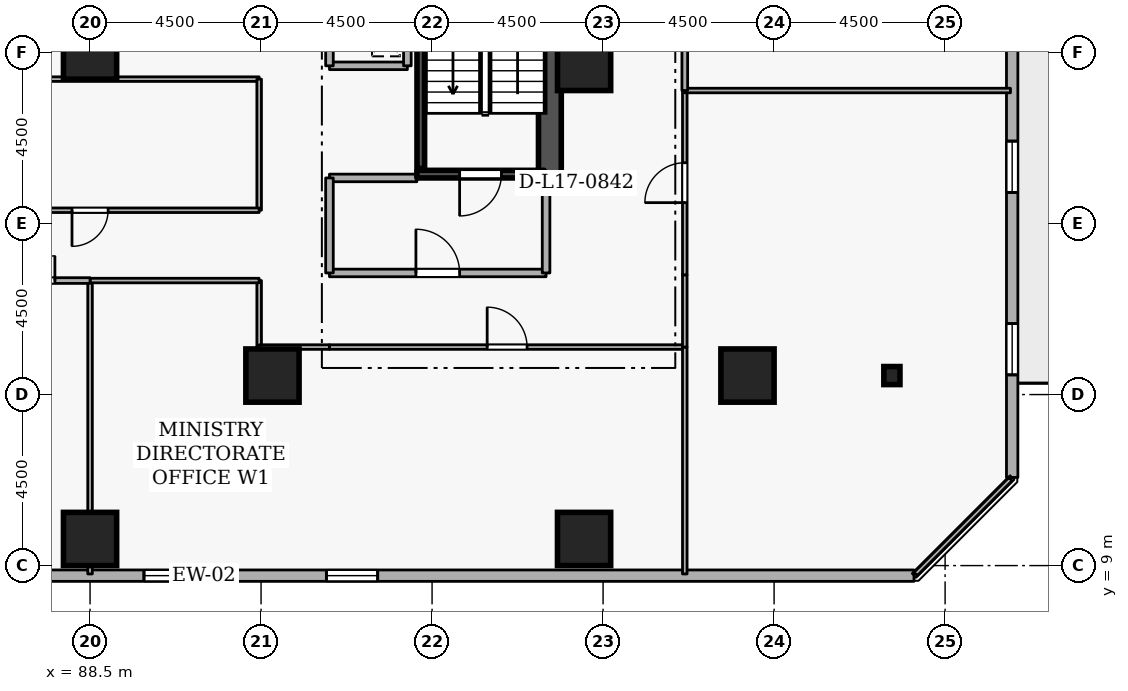
"""IFC4 building model, lengths in metres.
Left out: names, types, materials, properties, quantities, classifications, styles, units other than length and angle.
Written with IfcOpenShell. Run it as: python <this file> out.ifc"""

import sys

from ifc_helpers import new_model, si_unit, direction, frame, frame_2d, origin, origin_2d, place, context, subcontext, project, spatial, rectangle, i_section, extrude, element, fill, save


model = new_model("IFC4")
c1 = context("Model", 3, precision=1e-05, world=origin(), true_north=direction((0.0, 1.0)))
c2 = subcontext(c1, "Body", "Model", "MODEL_VIEW")
j1 = project(units=[si_unit("LENGTHUNIT", "METRE"), si_unit("PLANEANGLEUNIT", "RADIAN")], contexts=[c1])
p1 = place(None, origin())
s1 = spatial("IfcSite", under=j1, at=p1, CompositionType="ELEMENT")
p2 = place(p1, origin())
s2 = spatial("IfcBuilding", under=s1, at=p2, CompositionType="ELEMENT")
p3 = place(p2, frame((0.0, 0.0, 68.1)))
s3 = spatial("IfcBuildingStorey", under=s2, at=p3, CompositionType="ELEMENT", Elevation=68.1)
p4 = place(p3, frame((100.6, 19.2, 0.0), z_axis=(0.0, 0.0, 1.0), x_axis=(0.0, 1.0, 0.0)))
e1 = element("IfcWall", 1, at=p4, inside=s3, PredefinedType="SHEAR", context=c2, shape_type="SweptSolid", body=[
    extrude(rectangle(XDim=15.6, YDim=0.6, at=frame_2d((7.8, 0.0))), origin(), (0.0, 0.0, 1.0), 3.6),
])
for number, where, z_axis, x_axis in (
    (2, (105.8, 14.0, 0.0), (0.0, 0.0, 1.0), (1.0, 0.0, 0.0)),
    (3, (101.5, 9.7, 0.0), (0.0, 0.0, 1.0), (1.0, 0.0, 0.0)),
    (4, (88.5, 9.7, 0.0), (0.0, 0.0, 1.0), (1.0, 0.0, 0.0)),
    (5, (93.3, 14.0, 0.0), (0.0, 0.0, 1.0), (1.0, 0.0, 0.0)),
    (6, (101.5, 22.2, 0.0), (0.0, 0.0, 1.0), (1.0, 0.0, 0.0)),
    (7, (88.5, 22.5, 0.0), (0.0, 0.0, 1.0), (1.0, 0.0, 0.0)),
):
    element("IfcColumn", number, at=place(p3, frame(where, z_axis=z_axis, x_axis=x_axis)), inside=s3, PredefinedType="COLUMN", context=c2, shape_type="SweptSolid", body=[
        extrude(rectangle(XDim=1.4, YDim=1.4, at=origin_2d()), origin(), (0.0, 0.0, 1.0), 3.6),
    ])
p5 = place(p3, frame((109.6, 14.0, 0.0), z_axis=(0.0, 0.0, 1.0), x_axis=(1.0, 0.0, 0.0)))
e8 = element("IfcColumn", 8, at=p5, inside=s3, PredefinedType="COLUMN", context=c2, shape_type="SweptSolid", body=[
    extrude(i_section(OverallWidth=0.424, OverallDepth=0.475, WebThickness=0.048, FlangeThickness=0.077, FilletRadius=0.015, at=origin_2d()), origin(), (0.0, 0.0, 1.0), 3.6),
])
p6 = place(p3, frame((72.819, 8.735, 0.0), z_axis=(0.0, 0.0, 1.0), x_axis=(1.0, 0.0, 0.0)))
e9 = element("IfcWall", 9, at=p6, inside=s3, PredefinedType="STANDARD", context=c2, shape_type="SweptSolid", body=[
    extrude(rectangle(XDim=37.362, YDim=0.3, at=frame_2d((18.681, 0.0))), origin(), (0.0, 0.0, 1.0), 2.66),
])
p7 = place(p6, frame((7.5, 0.0, 0.72)))
e10 = element("IfcOpeningElement", 10, at=p7, cuts=e9, PredefinedType="OPENING", context=c2, shape_type="SweptSolid", body=[
    extrude(rectangle(XDim=1.35, YDim=1.05, at=frame_2d((0.675, 0.525))), frame((0.0, 0.16, 0.0), z_axis=(0.0, -1.0, 0.0), x_axis=(1.0, 0.0, 0.0)), (0.0, 0.0, 1.0), 0.32),
])
p8 = place(p6, frame((17.1, 0.0, 0.72)))
e11 = element("IfcOpeningElement", 11, at=p8, cuts=e9, PredefinedType="OPENING", context=c2, shape_type="SweptSolid", body=[
    extrude(rectangle(XDim=1.35, YDim=1.05, at=frame_2d((0.675, 0.525))), frame((0.0, 0.16, 0.0), z_axis=(0.0, -1.0, 0.0), x_axis=(1.0, 0.0, 0.0)), (0.0, 0.0, 1.0), 0.32),
])
p9 = place(p6, frame((21.9, 0.0, 0.72)))
e12 = element("IfcOpeningElement", 12, at=p9, cuts=e9, PredefinedType="OPENING", context=c2, shape_type="SweptSolid", body=[
    extrude(rectangle(XDim=1.35, YDim=1.05, at=frame_2d((0.675, 0.525))), frame((0.0, 0.16, 0.0), z_axis=(0.0, -1.0, 0.0), x_axis=(1.0, 0.0, 0.0)), (0.0, 0.0, 1.0), 0.32),
])
p10 = place(p3, frame((112.765, 11.319, 0.0), z_axis=(0.0, 0.0, 1.0), x_axis=(0.0, 1.0, 0.0)))
e13 = element("IfcWall", 13, at=p10, inside=s3, PredefinedType="STANDARD", context=c2, shape_type="SweptSolid", body=[
    extrude(rectangle(XDim=37.362, YDim=0.3, at=frame_2d((18.681, 0.0))), origin(), (0.0, 0.0, 1.0), 2.66),
])
p11 = place(p10, frame((19.581, 0.0, 0.0)))
e14 = element("IfcOpeningElement", 14, at=p11, cuts=e13, PredefinedType="OPENING", context=c2, shape_type="SweptSolid", body=[
    extrude(rectangle(XDim=1.0, YDim=2.08, at=frame_2d((0.5, 1.04))), frame((0.0, 0.16, 0.0), z_axis=(0.0, -1.0, 0.0), x_axis=(1.0, 0.0, 0.0)), (0.0, 0.0, 1.0), 0.32),
])
p12 = place(p10, frame((2.7, 0.0, 0.72)))
e15 = element("IfcOpeningElement", 15, at=p12, cuts=e13, PredefinedType="OPENING", context=c2, shape_type="SweptSolid", body=[
    extrude(rectangle(XDim=1.35, YDim=1.05, at=frame_2d((0.675, 0.525))), frame((0.0, 0.16, 0.0), z_axis=(0.0, -1.0, 0.0), x_axis=(1.0, 0.0, 0.0)), (0.0, 0.0, 1.0), 0.32),
])
p13 = place(p10, frame((7.5, 0.0, 0.72)))
e16 = element("IfcOpeningElement", 16, at=p13, cuts=e13, PredefinedType="OPENING", context=c2, shape_type="SweptSolid", body=[
    extrude(rectangle(XDim=1.35, YDim=1.05, at=frame_2d((0.675, 0.525))), frame((0.0, 0.16, 0.0), z_axis=(0.0, -1.0, 0.0), x_axis=(1.0, 0.0, 0.0)), (0.0, 0.0, 1.0), 0.32),
])
p14 = place(p10, frame((12.3, 0.0, 0.72)))
e17 = element("IfcOpeningElement", 17, at=p14, cuts=e13, PredefinedType="OPENING", context=c2, shape_type="SweptSolid", body=[
    extrude(rectangle(XDim=1.35, YDim=1.05, at=frame_2d((0.675, 0.525))), frame((0.0, 0.16, 0.0), z_axis=(0.0, -1.0, 0.0), x_axis=(1.0, 0.0, 0.0)), (0.0, 0.0, 1.0), 0.32),
])
p15 = place(p10, frame((17.1, 0.0, 0.72)))
e18 = element("IfcOpeningElement", 18, at=p15, cuts=e13, PredefinedType="OPENING", context=c2, shape_type="SweptSolid", body=[
    extrude(rectangle(XDim=1.35, YDim=1.05, at=frame_2d((0.675, 0.525))), frame((0.0, 0.16, 0.0), z_axis=(0.0, -1.0, 0.0), x_axis=(1.0, 0.0, 0.0)), (0.0, 0.0, 1.0), 0.32),
])
p16 = place(p10, frame((21.9, 0.0, 0.72)))
e19 = element("IfcOpeningElement", 19, at=p16, cuts=e13, PredefinedType="OPENING", context=c2, shape_type="SweptSolid", body=[
    extrude(rectangle(XDim=1.35, YDim=1.05, at=frame_2d((0.675, 0.525))), frame((0.0, 0.16, 0.0), z_axis=(0.0, -1.0, 0.0), x_axis=(1.0, 0.0, 0.0)), (0.0, 0.0, 1.0), 0.32),
])
p17 = place(p10, frame((26.7, 0.0, 0.72)))
e20 = element("IfcOpeningElement", 20, at=p17, cuts=e13, PredefinedType="OPENING", context=c2, shape_type="SweptSolid", body=[
    extrude(rectangle(XDim=1.35, YDim=1.05, at=frame_2d((0.675, 0.525))), frame((0.0, 0.16, 0.0), z_axis=(0.0, -1.0, 0.0), x_axis=(1.0, 0.0, 0.0)), (0.0, 0.0, 1.0), 0.32),
])
p18 = place(p10, frame((31.5, 0.0, 0.72)))
e21 = element("IfcOpeningElement", 21, at=p18, cuts=e13, PredefinedType="OPENING", context=c2, shape_type="SweptSolid", body=[
    extrude(rectangle(XDim=1.35, YDim=1.05, at=frame_2d((0.675, 0.525))), frame((0.0, 0.16, 0.0), z_axis=(0.0, -1.0, 0.0), x_axis=(1.0, 0.0, 0.0)), (0.0, 0.0, 1.0), 0.32),
])
p19 = place(p3, frame((100.45, 19.3, 0.0), z_axis=(0.0, 0.0, 1.0), x_axis=(-1.0, 0.0, 0.0)))
e22 = element("IfcWall", 22, at=p19, inside=s3, PredefinedType="SHEAR", context=c2, shape_type="SweptSolid", body=[
    extrude(rectangle(XDim=3.35, YDim=0.2, at=frame_2d((1.675, 0.0))), origin(), (0.0, 0.0, 1.0), 3.6),
])
p20 = place(p19, frame((1.125, 0.0, 0.0)))
e23 = element("IfcOpeningElement", 23, at=p20, cuts=e22, PredefinedType="OPENING", context=c2, shape_type="SweptSolid", body=[
    extrude(rectangle(XDim=1.1, YDim=2.1, at=frame_2d((0.55, 1.05))), frame((0.0, 0.11, 0.0), z_axis=(0.0, -1.0, 0.0), x_axis=(1.0, 0.0, 0.0)), (0.0, 0.0, 1.0), 0.22),
])
p21 = place(p3, frame((97.203, 26.55, 0.0), z_axis=(0.0, 0.0, 1.0), x_axis=(0.0, -1.0, 0.0)))
e24 = element("IfcWall", 24, at=p21, inside=s3, PredefinedType="SHEAR", context=c2, shape_type="SweptSolid", body=[
    extrude(rectangle(XDim=7.1, YDim=0.2, at=frame_2d((3.55, 0.0))), origin(), (0.0, 0.0, 1.0), 3.6),
])
p22 = place(p3, frame((94.8, 16.7, 0.0), z_axis=(0.0, 0.0, 1.0), x_axis=(1.0, 0.0, 0.0)))
e25 = element("IfcWall", 25, at=p22, inside=s3, PredefinedType="STANDARD", context=c2, shape_type="SweptSolid", body=[
    extrude(rectangle(XDim=5.7, YDim=0.2, at=frame_2d((2.85, 0.0))), origin(), (0.0, 0.0, 1.0), 3.26),
])
p23 = place(p22, frame((2.275, 0.0, 0.0)))
e26 = element("IfcOpeningElement", 26, at=p23, cuts=e25, PredefinedType="OPENING", context=c2, shape_type="SweptSolid", body=[
    extrude(rectangle(XDim=1.15, YDim=2.1, at=frame_2d((0.575, 1.05))), frame((0.0, 0.11, 0.0), z_axis=(0.0, -1.0, 0.0), x_axis=(1.0, 0.0, 0.0)), (0.0, 0.0, 1.0), 0.22),
])
p24 = place(p3, frame((100.5, 16.7, 0.0), z_axis=(0.0, 0.0, 1.0), x_axis=(0.0, 1.0, 0.0)))
e27 = element("IfcWall", 27, at=p24, inside=s3, PredefinedType="STANDARD", context=c2, shape_type="SweptSolid", body=[
    extrude(rectangle(XDim=2.5, YDim=0.2, at=frame_2d((1.25, 0.0))), origin(), (0.0, 0.0, 1.0), 3.26),
])
p25 = place(p3, frame((97.1, 19.2, 0.0), z_axis=(0.0, 0.0, 1.0), x_axis=(-1.0, 0.0, 0.0)))
e28 = element("IfcWall", 28, at=p25, inside=s3, PredefinedType="STANDARD", context=c2, shape_type="SweptSolid", body=[
    extrude(rectangle(XDim=2.3, YDim=0.2, at=frame_2d((1.15, 0.0))), origin(), (0.0, 0.0, 1.0), 2.465),
])
p26 = place(p3, frame((94.8, 19.2, 0.0), z_axis=(0.0, 0.0, 1.0), x_axis=(0.0, -1.0, 0.0)))
e29 = element("IfcWall", 29, at=p26, inside=s3, PredefinedType="STANDARD", context=c2, shape_type="SweptSolid", body=[
    extrude(rectangle(XDim=2.5, YDim=0.2, at=frame_2d((1.25, 0.0))), origin(), (0.0, 0.0, 1.0), 3.26),
])
p27 = place(p3, frame((94.8, 22.15, 0.0), z_axis=(0.0, 0.0, 1.0), x_axis=(1.0, 0.0, 0.0)))
e30 = element("IfcWall", 30, at=p27, inside=s3, PredefinedType="STANDARD", context=c2, shape_type="SweptSolid", body=[
    extrude(rectangle(XDim=2.05, YDim=0.2, at=frame_2d((1.025, 0.0))), origin(), (0.0, 0.0, 1.0), 3.26),
])
p28 = place(p3, frame((96.85, 22.15, 0.0), z_axis=(0.0, 0.0, 1.0), x_axis=(0.0, 1.0, 0.0)))
e31 = element("IfcWall", 31, at=p28, inside=s3, PredefinedType="STANDARD", context=c2, shape_type="SweptSolid", body=[
    extrude(rectangle(XDim=1.8, YDim=0.2, at=frame_2d((0.9, 0.0))), origin(), (0.0, 0.0, 1.0), 3.26),
])
p29 = place(p3, frame((94.8, 23.95, 0.0), z_axis=(0.0, 0.0, 1.0), x_axis=(0.0, -1.0, 0.0)))
e32 = element("IfcWall", 32, at=p29, inside=s3, PredefinedType="STANDARD", context=c2, shape_type="SweptSolid", body=[
    extrude(rectangle(XDim=1.8, YDim=0.2, at=frame_2d((0.9, 0.0))), origin(), (0.0, 0.0, 1.0), 3.26),
])
p30 = place(p29, frame((0.46, 0.0, 0.0)))
e33 = element("IfcOpeningElement", 33, at=p30, cuts=e32, PredefinedType="OPENING", context=c2, shape_type="SweptSolid", body=[
    extrude(rectangle(XDim=0.88, YDim=2.04, at=frame_2d((0.44, 1.02))), frame((0.0, 0.11, 0.0), z_axis=(0.0, -1.0, 0.0), x_axis=(1.0, 0.0, 0.0)), (0.0, 0.0, 1.0), 0.22),
])
p31 = place(p3, frame((92.95, 16.5, 0.0), z_axis=(0.0, 0.0, 1.0), x_axis=(0.0, -1.0, 0.0)))
e34 = element("IfcWall", 34, at=p31, inside=s3, PredefinedType="PARTITIONING", context=c2, shape_type="SweptSolid", body=[
    extrude(rectangle(XDim=1.75, YDim=0.12, at=frame_2d((0.875, 0.0))), origin(), (0.0, 0.0, 1.0), 3.26),
])
p32 = place(p3, frame((92.95, 14.75, 0.0), z_axis=(0.0, 0.0, 1.0), x_axis=(1.0, 0.0, 0.0)))
e35 = element("IfcWall", 35, at=p32, inside=s3, PredefinedType="PARTITIONING", context=c2, shape_type="SweptSolid", body=[
    extrude(rectangle(XDim=1.85, YDim=0.12, at=frame_2d((0.925, 0.0))), origin(), (0.0, 0.0, 1.0), 3.26),
])
p33 = place(p3, frame((94.8, 14.75, 0.0), z_axis=(0.0, 0.0, 1.0), x_axis=(1.0, 0.0, 0.0)))
e36 = element("IfcWall", 36, at=p33, inside=s3, PredefinedType="PARTITIONING", context=c2, shape_type="SweptSolid", body=[
    extrude(rectangle(XDim=9.35, YDim=0.12, at=frame_2d((4.675, 0.0))), origin(), (0.0, 0.0, 1.0), 3.26),
])
p34 = place(p33, frame((4.15, 0.0, 0.0)))
e37 = element("IfcOpeningElement", 37, at=p34, cuts=e36, PredefinedType="OPENING", context=c2, shape_type="SweptSolid", body=[
    extrude(rectangle(XDim=1.05, YDim=2.1, at=frame_2d((0.525, 1.05))), frame((0.0, 0.07, 0.0), z_axis=(0.0, -1.0, 0.0), x_axis=(1.0, 0.0, 0.0)), (0.0, 0.0, 1.0), 0.14),
])
p35 = place(p3, frame((104.15, 14.75, 0.0), z_axis=(0.0, 0.0, 1.0), x_axis=(0.0, -1.0, 0.0)))
e38 = element("IfcWall", 38, at=p35, inside=s3, PredefinedType="PARTITIONING", context=c2, shape_type="SweptSolid", body=[
    extrude(rectangle(XDim=5.97, YDim=0.12, at=frame_2d((2.985, 0.0))), origin(), (0.0, 0.0, 1.0), 3.26),
])
p36 = place(p3, frame((88.5, 8.78, 0.0), z_axis=(0.0, 0.0, 1.0), x_axis=(0.0, 1.0, 0.0)))
e39 = element("IfcWall", 39, at=p36, inside=s3, PredefinedType="PARTITIONING", context=c2, shape_type="SweptSolid", body=[
    extrude(rectangle(XDim=7.72, YDim=0.12, at=frame_2d((3.86, 0.0))), origin(), (0.0, 0.0, 1.0), 2.798),
])
p37 = place(p3, frame((88.5, 16.5, 0.0), z_axis=(0.0, 0.0, 1.0), x_axis=(1.0, 0.0, 0.0)))
e40 = element("IfcWall", 40, at=p37, inside=s3, PredefinedType="PARTITIONING", context=c2, shape_type="SweptSolid", body=[
    extrude(rectangle(XDim=4.45, YDim=0.12, at=frame_2d((2.225, 0.0))), origin(), (0.0, 0.0, 1.0), 3.26),
])
p38 = place(p3, frame((85.35, 16.5, 0.0), z_axis=(0.0, 0.0, 1.0), x_axis=(1.0, 0.0, 0.0)))
e41 = element("IfcWall", 41, at=p38, inside=s3, PredefinedType="PARTITIONING", context=c2, shape_type="SweptSolid", body=[
    extrude(rectangle(XDim=3.15, YDim=0.15, at=frame_2d((1.575, 0.0))), origin(), (0.0, 0.0, 1.0), 3.26),
])
p39 = place(p38, frame((0.925, 0.0, 0.0)))
e42 = element("IfcOpeningElement", 42, at=p39, cuts=e41, PredefinedType="OPENING", context=c2, shape_type="SweptSolid", body=[
    extrude(rectangle(XDim=1.3, YDim=2.12, at=frame_2d((0.65, 1.06))), frame((0.0, 0.085, 0.0), z_axis=(0.0, -1.0, 0.0), x_axis=(1.0, 0.0, 0.0)), (0.0, 0.0, 1.0), 0.17),
])
p40 = place(p3, frame((84.05, 21.8, 0.0), z_axis=(0.0, 0.0, 1.0), x_axis=(1.0, 0.0, 0.0)))
e43 = element("IfcWall", 43, at=p40, inside=s3, PredefinedType="PARTITIONING", context=c2, shape_type="SweptSolid", body=[
    extrude(rectangle(XDim=8.9, YDim=0.12, at=frame_2d((4.45, 0.0))), origin(), (0.0, 0.0, 1.0), 3.26),
])
p41 = place(p3, frame((92.95, 21.8, 0.0), z_axis=(0.0, 0.0, 1.0), x_axis=(0.0, -1.0, 0.0)))
e44 = element("IfcWall", 44, at=p41, inside=s3, PredefinedType="PARTITIONING", context=c2, shape_type="SweptSolid", body=[
    extrude(rectangle(XDim=3.45, YDim=0.12, at=frame_2d((1.725, 0.0))), origin(), (0.0, 0.0, 1.0), 3.26),
])
p42 = place(p3, frame((92.95, 18.35, 0.0), z_axis=(0.0, 0.0, 1.0), x_axis=(-1.0, 0.0, 0.0)))
e45 = element("IfcWall", 45, at=p42, inside=s3, PredefinedType="PARTITIONING", context=c2, shape_type="SweptSolid", body=[
    extrude(rectangle(XDim=8.9, YDim=0.12, at=frame_2d((4.45, 0.0))), origin(), (0.0, 0.0, 1.0), 3.26),
])
p43 = place(p42, frame((3.975, 0.0, 0.0)))
e46 = element("IfcOpeningElement", 46, at=p43, cuts=e45, PredefinedType="OPENING", context=c2, shape_type="SweptSolid", body=[
    extrude(rectangle(XDim=0.95, YDim=2.1, at=frame_2d((0.475, 1.05))), frame((0.0, 0.07, 0.0), z_axis=(0.0, -1.0, 0.0), x_axis=(1.0, 0.0, 0.0)), (0.0, 0.0, 1.0), 0.14),
])
p44 = place(p3, frame((104.15, 14.75, 0.0), z_axis=(0.0, 0.0, 1.0), x_axis=(0.0, 1.0, 0.0)))
e47 = element("IfcWall", 47, at=p44, inside=s3, PredefinedType="PARTITIONING", context=c2, shape_type="SweptSolid", body=[
    extrude(rectangle(XDim=1.9, YDim=0.12, at=frame_2d((0.95, 0.0))), origin(), (0.0, 0.0, 1.0), 3.26),
])
p45 = place(p3, frame((104.15, 16.65, 0.0), z_axis=(0.0, 0.0, 1.0), x_axis=(0.0, 1.0, 0.0)))
e48 = element("IfcWall", 48, at=p45, inside=s3, PredefinedType="PARTITIONING", context=c2, shape_type="SweptSolid", body=[
    extrude(rectangle(XDim=4.85, YDim=0.12, at=frame_2d((2.425, 0.0))), origin(), (0.0, 0.0, 1.0), 3.26),
])
p46 = place(p45, frame((1.9, 0.0, 0.0)))
e49 = element("IfcOpeningElement", 49, at=p46, cuts=e48, PredefinedType="OPENING", context=c2, shape_type="SweptSolid", body=[
    extrude(rectangle(XDim=1.05, YDim=2.1, at=frame_2d((0.525, 1.05))), frame((0.0, 0.07, 0.0), z_axis=(0.0, -1.0, 0.0), x_axis=(1.0, 0.0, 0.0)), (0.0, 0.0, 1.0), 0.14),
])
p47 = place(p3, frame((104.15, 21.5, 0.0), z_axis=(0.0, 0.0, 1.0), x_axis=(1.0, 0.0, 0.0)))
e50 = element("IfcWall", 50, at=p47, inside=s3, PredefinedType="PARTITIONING", context=c2, shape_type="SweptSolid", body=[
    extrude(rectangle(XDim=8.57, YDim=0.12, at=frame_2d((4.285, 0.0))), origin(), (0.0, 0.0, 1.0), 3.26),
])
p48 = place(p3, frame((112.72, 11.275, 0.0), z_axis=(0.0, 0.0, 1.0), x_axis=(-0.707106781187, -0.707106781187, 0.0)))
e51 = element("IfcWall", 51, at=p48, inside=s3, PredefinedType="PARTITIONING", context=c2, shape_type="SweptSolid", body=[
    extrude(rectangle(XDim=3.528, YDim=0.12, at=frame_2d((1.764, 0.0))), origin(), (0.0, 0.0, 1.0), 3.26),
])
p49 = place(p3, frame((104.15, 21.5, 0.0), z_axis=(0.0, 0.0, 1.0), x_axis=(0.0, 1.0, 0.0)))
e52 = element("IfcWall", 52, at=p49, inside=s3, PredefinedType="PARTITIONING", context=c2, shape_type="SweptSolid", body=[
    extrude(rectangle(XDim=11.0, YDim=0.15, at=frame_2d((5.5, 0.0))), origin(), (0.0, 0.0, 1.0), 3.26),
])
p50 = place(p49, frame((3.655, 0.0, 0.0)))
e53 = element("IfcOpeningElement", 53, at=p50, cuts=e52, PredefinedType="OPENING", context=c2, shape_type="SweptSolid", body=[
    extrude(rectangle(XDim=1.05, YDim=2.1, at=frame_2d((0.525, 1.05))), frame((0.0, 0.085, 0.0), z_axis=(0.0, -1.0, 0.0), x_axis=(1.0, 0.0, 0.0)), (0.0, 0.0, 1.0), 0.17),
])
p51 = place(p8, origin())
e54 = element("IfcWindow", 54, at=p51, inside=s3, PartitioningType="SINGLE_PANEL", PredefinedType="WINDOW", context=c2, shape_type="SweptSolid", body=[
    extrude(rectangle(XDim=1.35, YDim=1.05, at=frame_2d((0.675, 0.525))), frame((0.0, 0.03, 0.0), z_axis=(0.0, -1.0, 0.0), x_axis=(1.0, 0.0, 0.0)), (0.0, 0.0, 1.0), 0.06),
])
fill(e11, e54)
p52 = place(p9, origin())
e55 = element("IfcWindow", 55, at=p52, inside=s3, PartitioningType="SINGLE_PANEL", PredefinedType="WINDOW", context=c2, shape_type="SweptSolid", body=[
    extrude(rectangle(XDim=1.35, YDim=1.05, at=frame_2d((0.675, 0.525))), frame((0.0, 0.03, 0.0), z_axis=(0.0, -1.0, 0.0), x_axis=(1.0, 0.0, 0.0)), (0.0, 0.0, 1.0), 0.06),
])
fill(e12, e55)
p53 = place(p12, origin())
e56 = element("IfcWindow", 56, at=p53, inside=s3, PartitioningType="SINGLE_PANEL", PredefinedType="WINDOW", context=c2, shape_type="SweptSolid", body=[
    extrude(rectangle(XDim=1.35, YDim=1.05, at=frame_2d((0.675, 0.525))), frame((0.0, 0.03, 0.0), z_axis=(0.0, -1.0, 0.0), x_axis=(1.0, 0.0, 0.0)), (0.0, 0.0, 1.0), 0.06),
])
fill(e15, e56)
p54 = place(p13, origin())
e57 = element("IfcWindow", 57, at=p54, inside=s3, PartitioningType="SINGLE_PANEL", PredefinedType="WINDOW", context=c2, shape_type="SweptSolid", body=[
    extrude(rectangle(XDim=1.35, YDim=1.05, at=frame_2d((0.675, 0.525))), frame((0.0, 0.03, 0.0), z_axis=(0.0, -1.0, 0.0), x_axis=(1.0, 0.0, 0.0)), (0.0, 0.0, 1.0), 0.06),
])
fill(e16, e57)
p55 = place(p20, origin())
e58 = element("IfcDoor", 58, at=p55, inside=s3, OperationType="SINGLE_SWING_RIGHT", PredefinedType="DOOR", context=c2, shape_type="SweptSolid", body=[
    extrude(rectangle(XDim=1.1, YDim=2.1, at=frame_2d((0.55, 1.05))), frame((0.0, 0.025, 0.0), z_axis=(0.0, -1.0, 0.0), x_axis=(1.0, 0.0, 0.0)), (0.0, 0.0, 1.0), 0.05),
])
fill(e23, e58)
p56 = place(p23, origin())
e59 = element("IfcDoor", 59, at=p56, inside=s3, OperationType="SINGLE_SWING_LEFT", PredefinedType="DOOR", context=c2, shape_type="SweptSolid", body=[
    extrude(rectangle(XDim=1.15, YDim=2.1, at=frame_2d((0.575, 1.05))), frame((0.0, 0.025, 0.0), z_axis=(0.0, -1.0, 0.0), x_axis=(1.0, 0.0, 0.0)), (0.0, 0.0, 1.0), 0.05),
])
fill(e26, e59)
p57 = place(p34, origin())
e60 = element("IfcDoor", 60, at=p57, inside=s3, OperationType="SINGLE_SWING_LEFT", PredefinedType="DOOR", context=c2, shape_type="SweptSolid", body=[
    extrude(rectangle(XDim=1.05, YDim=2.1, at=frame_2d((0.525, 1.05))), frame((0.0, 0.025, 0.0), z_axis=(0.0, -1.0, 0.0), x_axis=(1.0, 0.0, 0.0)), (0.0, 0.0, 1.0), 0.05),
])
fill(e37, e60)
p58 = place(p39, origin())
e61 = element("IfcDoor", 61, at=p58, inside=s3, OperationType="DOUBLE_DOOR_SINGLE_SWING", PredefinedType="DOOR", context=c2, shape_type="SweptSolid", body=[
    extrude(rectangle(XDim=1.3, YDim=2.12, at=frame_2d((0.65, 1.06))), frame((0.0, 0.025, 0.0), z_axis=(0.0, -1.0, 0.0), x_axis=(1.0, 0.0, 0.0)), (0.0, 0.0, 1.0), 0.05),
])
fill(e42, e61)
p59 = place(p43, origin())
e62 = element("IfcDoor", 62, at=p59, inside=s3, OperationType="SINGLE_SWING_RIGHT", PredefinedType="DOOR", context=c2, shape_type="SweptSolid", body=[
    extrude(rectangle(XDim=0.95, YDim=2.1, at=frame_2d((0.475, 1.05))), frame((0.0, 0.025, 0.0), z_axis=(0.0, -1.0, 0.0), x_axis=(1.0, 0.0, 0.0)), (0.0, 0.0, 1.0), 0.05),
])
fill(e46, e62)
p60 = place(p46, origin())
e63 = element("IfcDoor", 63, at=p60, inside=s3, OperationType="SINGLE_SWING_LEFT", PredefinedType="DOOR", context=c2, shape_type="SweptSolid", body=[
    extrude(rectangle(XDim=1.05, YDim=2.1, at=frame_2d((0.525, 1.05))), frame((0.0, 0.025, 0.0), z_axis=(0.0, -1.0, 0.0), x_axis=(1.0, 0.0, 0.0)), (0.0, 0.0, 1.0), 0.05),
])
fill(e49, e63)
save(model, sys.argv[1])
